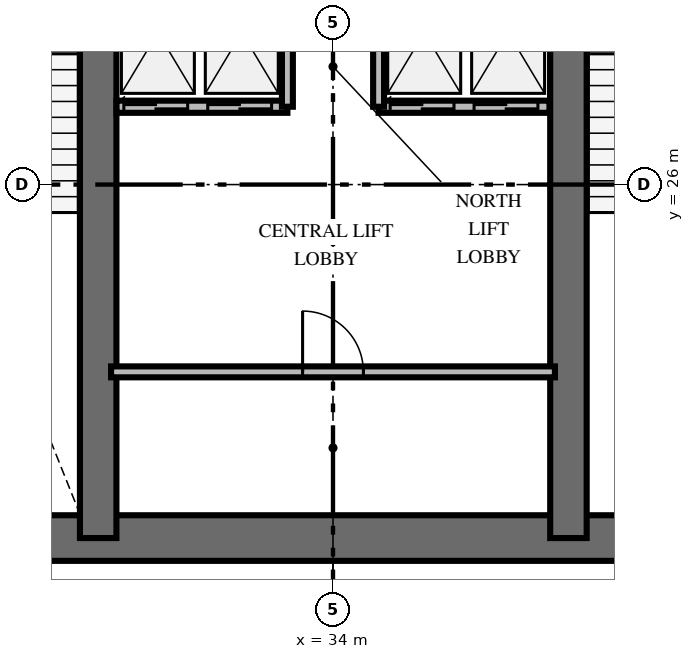
"""IFC4 building model, lengths in metres.
Left out: names, types, materials, properties, quantities, classifications, styles, units other than length and angle.
Written with IfcOpenShell. Run it as: python <this file> out.ifc"""

import sys

from ifc_helpers import new_model, si_unit, direction, frame, frame_2d, origin, place, context, subcontext, project, spatial, rectangle, extrude, element, fill, save


model = new_model("IFC4")
c1 = context("Model", 3, precision=1e-05, world=origin(), true_north=direction((0.0, 1.0)))
c2 = subcontext(c1, "Body", "Model", "MODEL_VIEW")
j1 = project(units=[si_unit("LENGTHUNIT", "METRE"), si_unit("PLANEANGLEUNIT", "RADIAN")], contexts=[c1])
p1 = place(None, origin())
s1 = spatial("IfcSite", under=j1, at=p1, CompositionType="ELEMENT")
p2 = place(p1, origin())
s2 = spatial("IfcBuilding", under=s1, at=p2, CompositionType="ELEMENT")
p3 = place(p2, frame((0.0, 0.0, 162.8)))
s3 = spatial("IfcBuildingStorey", under=s2, at=p3, CompositionType="ELEMENT", Elevation=162.8)
p4 = place(p3, frame((26.072, 20.187, 0.0), z_axis=(0.0, 0.0, 1.0), x_axis=(1.0, 0.0, 0.0)))
e1 = element("IfcWall", 1, at=p4, inside=s3, PredefinedType="SHEAR", context=c2, shape_type="SweptSolid", body=[
    extrude(rectangle(XDim=15.866, YDim=0.75, at=frame_2d((7.933, 0.0))), origin(), (0.0, 0.0, 1.0), 3.6),
])
for number, where, z_axis, x_axis in (
    (2, (30.138, 20.187, 0.0), (0.0, 0.0, 1.0), (0.0, 1.0, 0.0)),
    (3, (37.872, 20.187, 0.0), (0.0, 0.0, 1.0), (0.0, 1.0, 0.0)),
):
    element("IfcWall", number, at=place(p3, frame(where, z_axis=z_axis, x_axis=x_axis)), inside=s3, PredefinedType="SHEAR", context=c2, shape_type="SweptSolid", body=[
        extrude(rectangle(XDim=9.826, YDim=0.6, at=frame_2d((4.913, 0.0))), origin(), (0.0, 0.0, 1.0), 3.6),
    ])
p5 = place(p3, frame((30.35, 22.92, 0.0), z_axis=(0.0, 0.0, 1.0), x_axis=(1.0, 0.0, 0.0)))
e4 = element("IfcWall", 4, at=p5, inside=s3, PredefinedType="PARTITIONING", context=c2, shape_type="SweptSolid", body=[
    extrude(rectangle(XDim=7.3, YDim=0.18, at=frame_2d((3.65, 0.0))), origin(), (0.0, 0.0, 1.0), 2.46),
])
p6 = place(p5, frame((3.15, 0.0, 0.0)))
e5 = element("IfcOpeningElement", 5, at=p6, cuts=e4, PredefinedType="OPENING", context=c2, shape_type="SweptSolid", body=[
    extrude(rectangle(XDim=1.0, YDim=2.15, at=frame_2d((0.5, 1.075))), frame((0.0, 0.1, 0.0), z_axis=(0.0, -1.0, 0.0), x_axis=(1.0, 0.0, 0.0)), (0.0, 0.0, 1.0), 0.2),
])
p7 = place(p3, frame((30.44, 27.28, 0.0), z_axis=(0.0, 0.0, 1.0), x_axis=(1.0, 0.0, 0.0)))
e6 = element("IfcWall", 6, at=p7, inside=s3, PredefinedType="SOLIDWALL", context=c2, shape_type="SweptSolid", body=[
    extrude(rectangle(XDim=2.81, YDim=0.2, at=frame_2d((1.405, 0.0))), origin(), (0.0, 0.0, 1.0), 2.46),
])
p8 = place(p7, frame((0.12, 0.0, 0.0)))
e7 = element("IfcOpeningElement", 7, at=p8, cuts=e6, PredefinedType="OPENING", context=c2, shape_type="SweptSolid", body=[
    extrude(rectangle(XDim=1.05, YDim=2.1, at=frame_2d((0.525, 1.05))), frame((0.0, 0.11, 0.0), z_axis=(0.0, -1.0, 0.0), x_axis=(1.0, 0.0, 0.0)), (0.0, 0.0, 1.0), 0.22),
])
p9 = place(p7, frame((1.5, 0.0, 0.0)))
e8 = element("IfcOpeningElement", 8, at=p9, cuts=e6, PredefinedType="OPENING", context=c2, shape_type="SweptSolid", body=[
    extrude(rectangle(XDim=1.05, YDim=2.1, at=frame_2d((0.525, 1.05))), frame((0.0, 0.11, 0.0), z_axis=(0.0, -1.0, 0.0), x_axis=(1.0, 0.0, 0.0)), (0.0, 0.0, 1.0), 0.22),
])
p10 = place(p3, frame((33.25, 27.28, 0.0), z_axis=(0.0, 0.0, 1.0), x_axis=(0.0, 1.0, 0.0)))
e9 = element("IfcWall", 9, at=p10, inside=s3, PredefinedType="SOLIDWALL", context=c2, shape_type="SweptSolid", body=[
    extrude(rectangle(XDim=2.47, YDim=0.18, at=frame_2d((1.235, 0.0))), origin(), (0.0, 0.0, 1.0), 2.46),
])
p11 = place(p3, frame((34.75, 27.28, 0.0), z_axis=(0.0, 0.0, 1.0), x_axis=(1.0, 0.0, 0.0)))
e10 = element("IfcWall", 10, at=p11, inside=s3, PredefinedType="SOLIDWALL", context=c2, shape_type="SweptSolid", body=[
    extrude(rectangle(XDim=2.81, YDim=0.2, at=frame_2d((1.405, 0.0))), origin(), (0.0, 0.0, 1.0), 2.46),
])
p12 = place(p11, frame((0.19, 0.0, 0.0)))
e11 = element("IfcOpeningElement", 11, at=p12, cuts=e10, PredefinedType="OPENING", context=c2, shape_type="SweptSolid", body=[
    extrude(rectangle(XDim=1.05, YDim=2.1, at=frame_2d((0.525, 1.05))), frame((0.0, 0.11, 0.0), z_axis=(0.0, -1.0, 0.0), x_axis=(1.0, 0.0, 0.0)), (0.0, 0.0, 1.0), 0.22),
])
p13 = place(p11, frame((1.57, 0.0, 0.0)))
e12 = element("IfcOpeningElement", 12, at=p13, cuts=e10, PredefinedType="OPENING", context=c2, shape_type="SweptSolid", body=[
    extrude(rectangle(XDim=1.05, YDim=2.1, at=frame_2d((0.525, 1.05))), frame((0.0, 0.11, 0.0), z_axis=(0.0, -1.0, 0.0), x_axis=(1.0, 0.0, 0.0)), (0.0, 0.0, 1.0), 0.22),
])
p14 = place(p3, frame((34.75, 27.28, 0.0), z_axis=(0.0, 0.0, 1.0), x_axis=(0.0, 1.0, 0.0)))
e13 = element("IfcWall", 13, at=p14, inside=s3, PredefinedType="SOLIDWALL", context=c2, shape_type="SweptSolid", body=[
    extrude(rectangle(XDim=2.47, YDim=0.18, at=frame_2d((1.235, 0.0))), origin(), (0.0, 0.0, 1.0), 2.46),
])
p15 = place(p6, origin())
e14 = element("IfcDoor", 14, at=p15, inside=s3, OperationType="SINGLE_SWING_LEFT", PredefinedType="DOOR", context=c2, shape_type="SweptSolid", body=[
    extrude(rectangle(XDim=1.0, YDim=2.15, at=frame_2d((0.5, 1.075))), frame((0.0, 0.025, 0.0), z_axis=(0.0, -1.0, 0.0), x_axis=(1.0, 0.0, 0.0)), (0.0, 0.0, 1.0), 0.05),
])
fill(e5, e14)
p16 = place(p8, origin())
e15 = element("IfcDoor", 15, at=p16, inside=s3, OperationType="DOUBLE_DOOR_SLIDING", PredefinedType="USERDEFINED", context=c2, shape_type="SweptSolid", body=[
    extrude(rectangle(XDim=1.05, YDim=2.1, at=frame_2d((0.525, 1.05))), frame((0.0, 0.025, 0.0), z_axis=(0.0, -1.0, 0.0), x_axis=(1.0, 0.0, 0.0)), (0.0, 0.0, 1.0), 0.05),
])
fill(e7, e15)
p17 = place(p9, origin())
e16 = element("IfcDoor", 16, at=p17, inside=s3, OperationType="DOUBLE_DOOR_SLIDING", PredefinedType="USERDEFINED", context=c2, shape_type="SweptSolid", body=[
    extrude(rectangle(XDim=1.05, YDim=2.1, at=frame_2d((0.525, 1.05))), frame((0.0, 0.025, 0.0), z_axis=(0.0, -1.0, 0.0), x_axis=(1.0, 0.0, 0.0)), (0.0, 0.0, 1.0), 0.05),
])
fill(e8, e16)
p18 = place(p12, origin())
e17 = element("IfcDoor", 17, at=p18, inside=s3, OperationType="DOUBLE_DOOR_SLIDING", PredefinedType="USERDEFINED", context=c2, shape_type="SweptSolid", body=[
    extrude(rectangle(XDim=1.05, YDim=2.1, at=frame_2d((0.525, 1.05))), frame((0.0, 0.025, 0.0), z_axis=(0.0, -1.0, 0.0), x_axis=(1.0, 0.0, 0.0)), (0.0, 0.0, 1.0), 0.05),
])
fill(e11, e17)
p19 = place(p13, origin())
e18 = element("IfcDoor", 18, at=p19, inside=s3, OperationType="DOUBLE_DOOR_SLIDING", PredefinedType="USERDEFINED", context=c2, shape_type="SweptSolid", body=[
    extrude(rectangle(XDim=1.05, YDim=2.1, at=frame_2d((0.525, 1.05))), frame((0.0, 0.025, 0.0), z_axis=(0.0, -1.0, 0.0), x_axis=(1.0, 0.0, 0.0)), (0.0, 0.0, 1.0), 0.05),
])
fill(e12, e18)
save(model, sys.argv[1])
